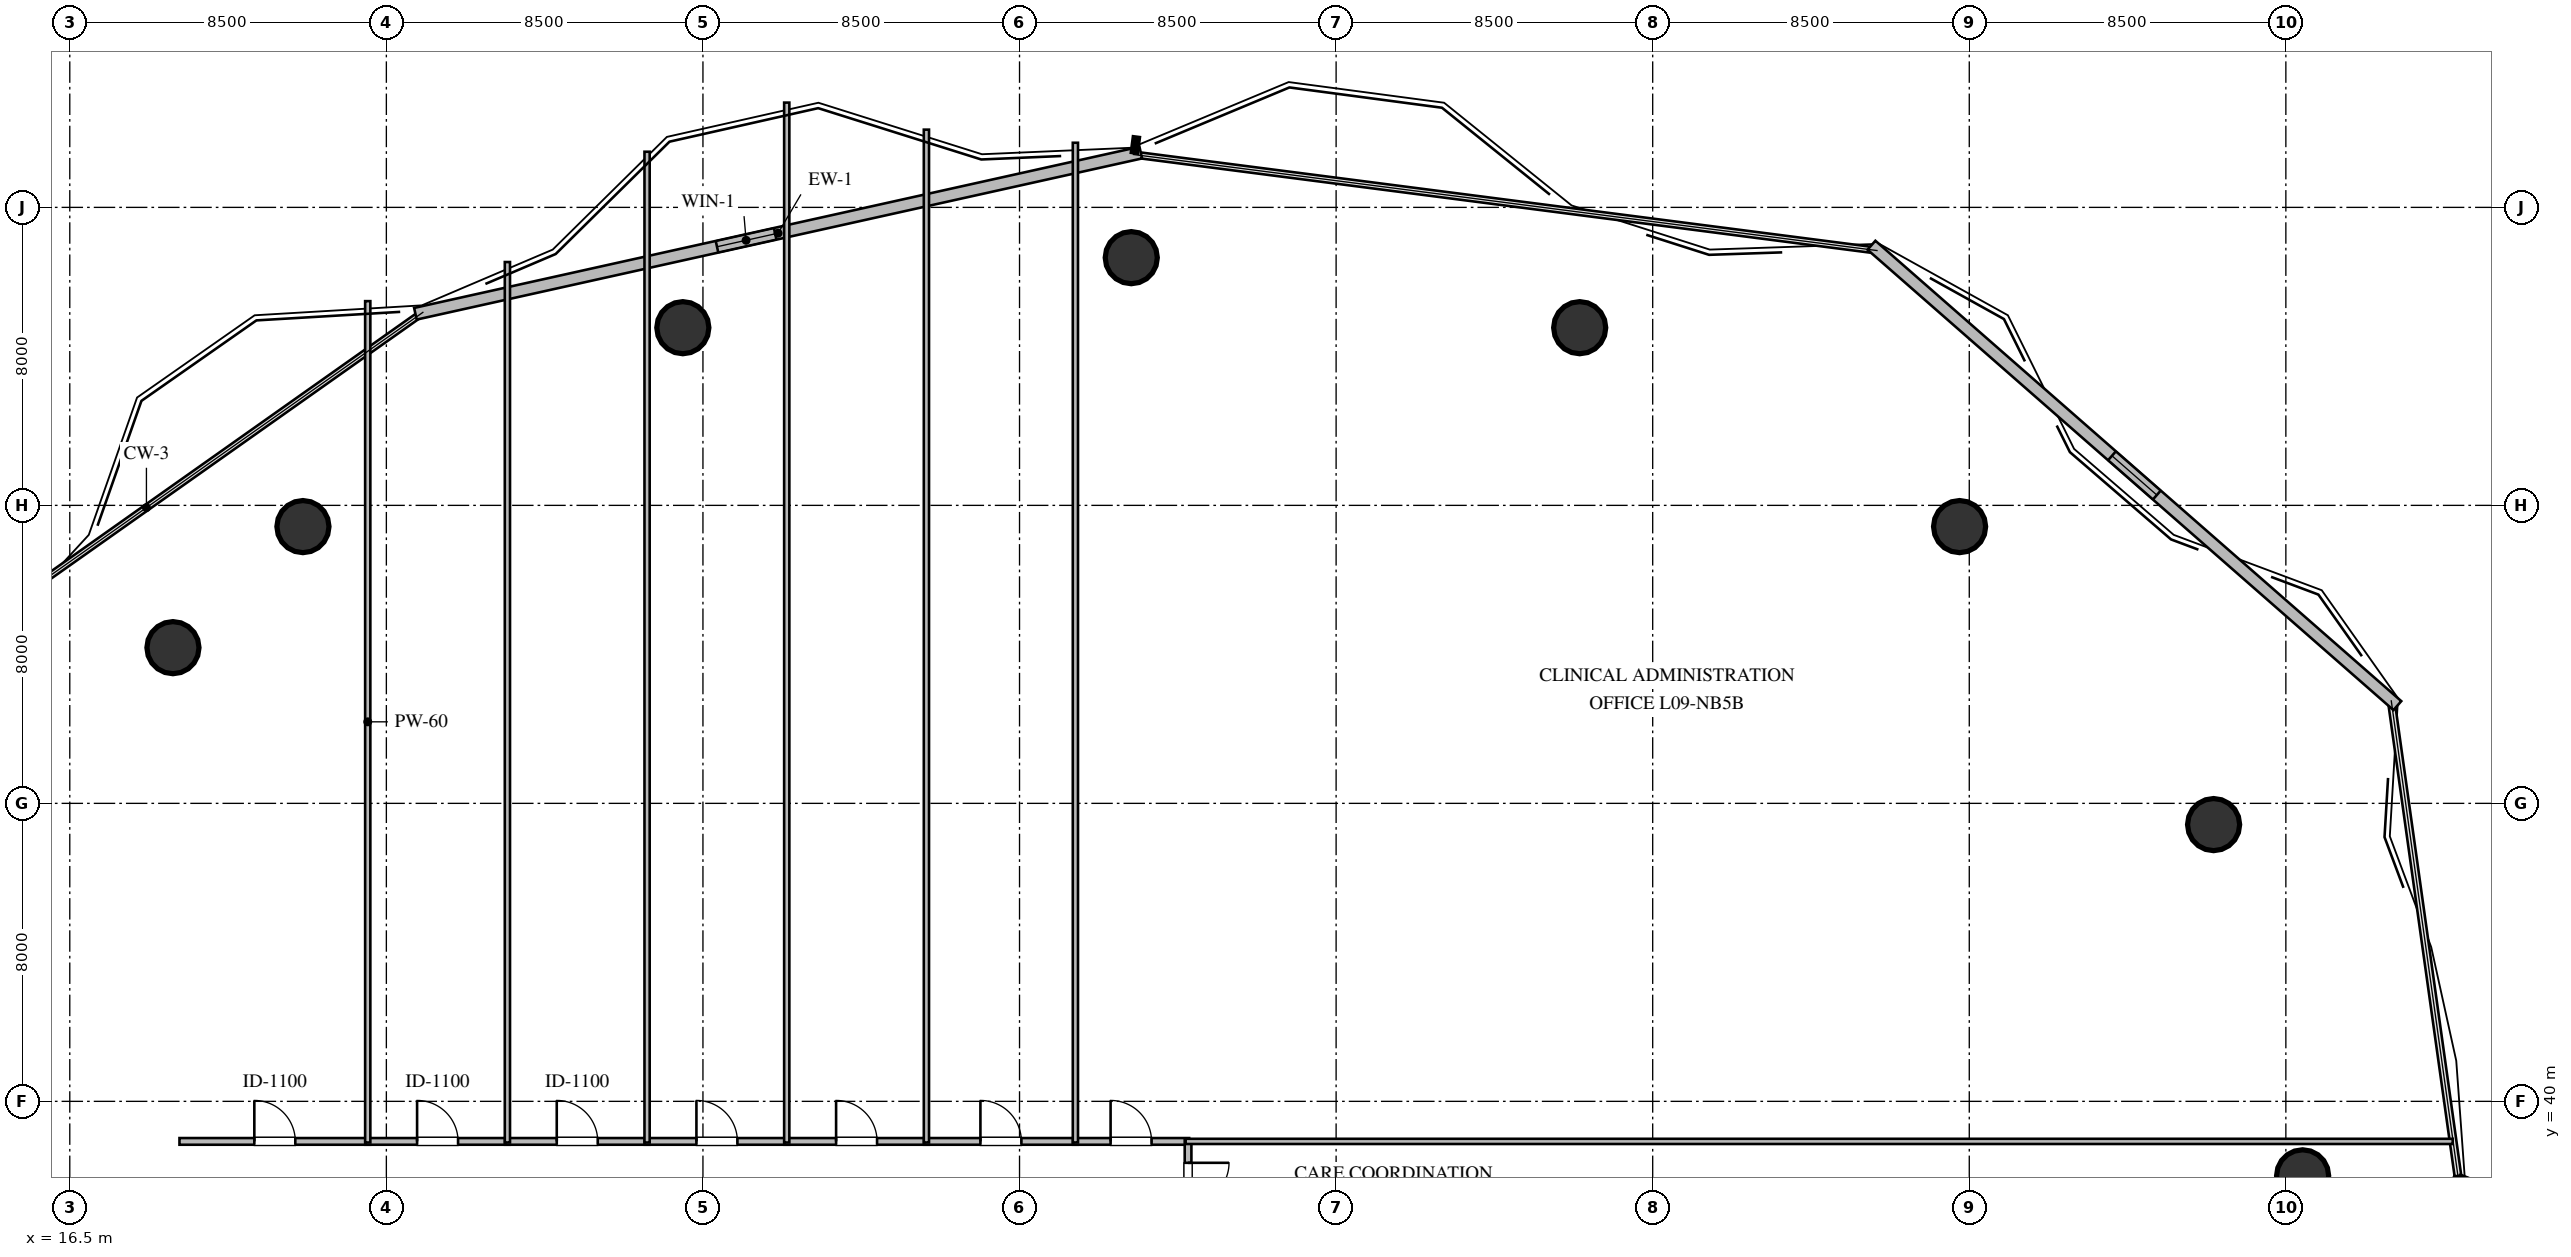
"""IFC4 building model, lengths in metres.
Left out: names, types, materials, properties, quantities, classifications, styles, units other than length and angle.
Written with IfcOpenShell. Run it as: python <this file> out.ifc"""

import sys

from ifc_helpers import new_model, si_unit, direction, frame, frame_2d, origin, origin_2d, place, context, subcontext, project, spatial, rectangle, circle, extrude, element, fill, save


model = new_model("IFC4")
c1 = context("Model", 3, precision=1e-05, world=origin(), true_north=direction((0.0, 1.0)))
c2 = subcontext(c1, "Body", "Model", "MODEL_VIEW")
j1 = project(units=[si_unit("LENGTHUNIT", "METRE"), si_unit("PLANEANGLEUNIT", "RADIAN")], contexts=[c1])
p1 = place(None, origin())
s1 = spatial("IfcSite", under=j1, at=p1, CompositionType="ELEMENT")
p2 = place(p1, origin())
s2 = spatial("IfcBuilding", under=s1, at=p2, CompositionType="ELEMENT")
p3 = place(p2, frame((0.0, 0.0, 38.4)))
s3 = spatial("IfcBuildingStorey", under=s2, at=p3, CompositionType="ELEMENT", Elevation=38.4)
for number, where, z_axis, x_axis in (
    (1, (76.45, 38.0, 0.0), (0.0, 0.0, 1.0), (1.0, 0.0, 0.0)),
    (2, (74.06, 47.43, 0.0), (0.0, 0.0, 1.0), (1.0, 0.0, 0.0)),
    (3, (67.24, 55.43, 0.0), (0.0, 0.0, 1.0), (1.0, 0.0, 0.0)),
    (4, (57.04, 60.77, 0.0), (0.0, 0.0, 1.0), (1.0, 0.0, 0.0)),
    (5, (45.0, 62.65, 0.0), (0.0, 0.0, 1.0), (1.0, 0.0, 0.0)),
    (6, (32.96, 60.77, 0.0), (0.0, 0.0, 1.0), (1.0, 0.0, 0.0)),
    (7, (22.76, 55.43, 0.0), (0.0, 0.0, 1.0), (1.0, 0.0, 0.0)),
    (8, (19.27, 52.18, 0.0), (0.0, 0.0, 1.0), (1.0, 0.0, 0.0)),
):
    element("IfcColumn", number, at=place(p3, frame(where, z_axis=z_axis, x_axis=x_axis)), inside=s3, PredefinedType="COLUMN", context=c2, shape_type="SweptSolid", body=[
        extrude(circle(Radius=0.7, at=origin_2d()), origin(), (0.0, 0.0, 1.0), 3.6),
    ])
p4 = place(p3, frame((25.78, 61.144, 0.0), z_axis=(0.0, 0.0, 1.0), x_axis=(0.976206349039, 0.216843639742, 0.0)))
e9 = element("IfcWall", 9, at=p4, inside=s3, PredefinedType="STANDARD", context=c2, shape_type="SweptSolid", body=[
    extrude(rectangle(XDim=19.949, YDim=0.32, at=frame_2d((9.975, 0.0))), origin(), (0.0, 0.0, 1.0), 3.36),
])
p5 = place(p4, frame((8.295, 0.0, 1.05)))
e10 = element("IfcOpeningElement", 10, at=p5, cuts=e9, PredefinedType="OPENING", context=c2, shape_type="SweptSolid", body=[
    extrude(rectangle(XDim=1.6, YDim=1.5, at=frame_2d((0.8, 0.75))), frame((0.0, 0.17, 0.0), z_axis=(0.0, -1.0, 0.0), x_axis=(1.0, 0.0, 0.0)), (0.0, 0.0, 1.0), 0.34),
])
p6 = place(p3, frame((64.874, 62.984, 0.0), z_axis=(0.0, 0.0, 1.0), x_axis=(0.752445311183, -0.658654730249, 0.0)))
e11 = element("IfcWall", 11, at=p6, inside=s3, PredefinedType="STANDARD", context=c2, shape_type="SweptSolid", body=[
    extrude(rectangle(XDim=18.765, YDim=0.32, at=frame_2d((9.383, 0.0))), origin(), (0.0, 0.0, 1.0), 3.36),
])
p7 = place(p6, frame((8.582, 0.0, 1.05)))
e12 = element("IfcOpeningElement", 12, at=p7, cuts=e11, PredefinedType="OPENING", context=c2, shape_type="SweptSolid", body=[
    extrude(rectangle(XDim=1.6, YDim=1.5, at=frame_2d((0.8, 0.75))), frame((0.0, 0.17, 0.0), z_axis=(0.0, -1.0, 0.0), x_axis=(1.0, 0.0, 0.0)), (0.0, 0.0, 1.0), 0.34),
])
p8 = place(p3, frame((19.445, 38.925, 0.0), z_axis=(0.0, 0.0, 1.0), x_axis=(1.0, 0.0, 0.0)))
e13 = element("IfcWall", 13, at=p8, inside=s3, PredefinedType="PARTITIONING", context=c2, shape_type="SweptSolid", body=[
    extrude(rectangle(XDim=5.12, YDim=0.18, at=frame_2d((2.56, 0.0))), origin(), (0.0, 0.0, 1.0), 3.36),
])
p9 = place(p8, frame((2.01, 0.0, 0.0)))
e14 = element("IfcOpeningElement", 14, at=p9, cuts=e13, PredefinedType="OPENING", context=c2, shape_type="SweptSolid", body=[
    extrude(rectangle(XDim=1.1, YDim=2.1, at=frame_2d((0.55, 1.05))), frame((0.0, 0.1, 0.0), z_axis=(0.0, -1.0, 0.0), x_axis=(1.0, 0.0, 0.0)), (0.0, 0.0, 1.0), 0.2),
])
p10 = place(p3, frame((24.435, 38.925, 0.0), z_axis=(0.0, 0.0, 1.0), x_axis=(1.0, 0.0, 0.0)))
e15 = element("IfcWall", 15, at=p10, inside=s3, PredefinedType="PARTITIONING", context=c2, shape_type="SweptSolid", body=[
    extrude(rectangle(XDim=3.88, YDim=0.18, at=frame_2d((1.94, 0.0))), origin(), (0.0, 0.0, 1.0), 3.36),
])
p11 = place(p10, frame((1.39, 0.0, 0.0)))
e16 = element("IfcOpeningElement", 16, at=p11, cuts=e15, PredefinedType="OPENING", context=c2, shape_type="SweptSolid", body=[
    extrude(rectangle(XDim=1.1, YDim=2.1, at=frame_2d((0.55, 1.05))), frame((0.0, 0.1, 0.0), z_axis=(0.0, -1.0, 0.0), x_axis=(1.0, 0.0, 0.0)), (0.0, 0.0, 1.0), 0.2),
])
p12 = place(p3, frame((28.185, 38.925, 0.0), z_axis=(0.0, 0.0, 1.0), x_axis=(1.0, 0.0, 0.0)))
e17 = element("IfcWall", 17, at=p12, inside=s3, PredefinedType="PARTITIONING", context=c2, shape_type="SweptSolid", body=[
    extrude(rectangle(XDim=3.88, YDim=0.18, at=frame_2d((1.94, 0.0))), origin(), (0.0, 0.0, 1.0), 3.36),
])
p13 = place(p12, frame((1.39, 0.0, 0.0)))
e18 = element("IfcOpeningElement", 18, at=p13, cuts=e17, PredefinedType="OPENING", context=c2, shape_type="SweptSolid", body=[
    extrude(rectangle(XDim=1.1, YDim=2.1, at=frame_2d((0.55, 1.05))), frame((0.0, 0.1, 0.0), z_axis=(0.0, -1.0, 0.0), x_axis=(1.0, 0.0, 0.0)), (0.0, 0.0, 1.0), 0.2),
])
p14 = place(p3, frame((31.935, 38.925, 0.0), z_axis=(0.0, 0.0, 1.0), x_axis=(1.0, 0.0, 0.0)))
e19 = element("IfcWall", 19, at=p14, inside=s3, PredefinedType="PARTITIONING", context=c2, shape_type="SweptSolid", body=[
    extrude(rectangle(XDim=3.88, YDim=0.18, at=frame_2d((1.94, 0.0))), origin(), (0.0, 0.0, 1.0), 3.36),
])
p15 = place(p14, frame((1.39, 0.0, 0.0)))
e20 = element("IfcOpeningElement", 20, at=p15, cuts=e19, PredefinedType="OPENING", context=c2, shape_type="SweptSolid", body=[
    extrude(rectangle(XDim=1.1, YDim=2.1, at=frame_2d((0.55, 1.05))), frame((0.0, 0.1, 0.0), z_axis=(0.0, -1.0, 0.0), x_axis=(1.0, 0.0, 0.0)), (0.0, 0.0, 1.0), 0.2),
])
p16 = place(p3, frame((35.685, 38.925, 0.0), z_axis=(0.0, 0.0, 1.0), x_axis=(1.0, 0.0, 0.0)))
e21 = element("IfcWall", 21, at=p16, inside=s3, PredefinedType="PARTITIONING", context=c2, shape_type="SweptSolid", body=[
    extrude(rectangle(XDim=3.88, YDim=0.18, at=frame_2d((1.94, 0.0))), origin(), (0.0, 0.0, 1.0), 3.36),
])
p17 = place(p16, frame((1.39, 0.0, 0.0)))
e22 = element("IfcOpeningElement", 22, at=p17, cuts=e21, PredefinedType="OPENING", context=c2, shape_type="SweptSolid", body=[
    extrude(rectangle(XDim=1.1, YDim=2.1, at=frame_2d((0.55, 1.05))), frame((0.0, 0.1, 0.0), z_axis=(0.0, -1.0, 0.0), x_axis=(1.0, 0.0, 0.0)), (0.0, 0.0, 1.0), 0.2),
])
p18 = place(p3, frame((39.435, 38.925, 0.0), z_axis=(0.0, 0.0, 1.0), x_axis=(1.0, 0.0, 0.0)))
e23 = element("IfcWall", 23, at=p18, inside=s3, PredefinedType="PARTITIONING", context=c2, shape_type="SweptSolid", body=[
    extrude(rectangle(XDim=4.13, YDim=0.18, at=frame_2d((2.065, 0.0))), origin(), (0.0, 0.0, 1.0), 3.36),
])
p19 = place(p18, frame((1.515, 0.0, 0.0)))
e24 = element("IfcOpeningElement", 24, at=p19, cuts=e23, PredefinedType="OPENING", context=c2, shape_type="SweptSolid", body=[
    extrude(rectangle(XDim=1.1, YDim=2.1, at=frame_2d((0.55, 1.05))), frame((0.0, 0.1, 0.0), z_axis=(0.0, -1.0, 0.0), x_axis=(1.0, 0.0, 0.0)), (0.0, 0.0, 1.0), 0.2),
])
p20 = place(p3, frame((43.435, 38.925, 0.0), z_axis=(0.0, 0.0, 1.0), x_axis=(1.0, 0.0, 0.0)))
e25 = element("IfcWall", 25, at=p20, inside=s3, PredefinedType="PARTITIONING", context=c2, shape_type="SweptSolid", body=[
    extrude(rectangle(XDim=3.12, YDim=0.18, at=frame_2d((1.56, 0.0))), origin(), (0.0, 0.0, 1.0), 3.36),
])
p21 = place(p20, frame((1.01, 0.0, 0.0)))
e26 = element("IfcOpeningElement", 26, at=p21, cuts=e25, PredefinedType="OPENING", context=c2, shape_type="SweptSolid", body=[
    extrude(rectangle(XDim=1.1, YDim=2.1, at=frame_2d((0.55, 1.05))), frame((0.0, 0.1, 0.0), z_axis=(0.0, -1.0, 0.0), x_axis=(1.0, 0.0, 0.0)), (0.0, 0.0, 1.0), 0.2),
])
p22 = place(p3, frame((46.525, 38.955, 0.0), z_axis=(0.0, 0.0, 1.0), x_axis=(0.0, -1.0, 0.0)))
e27 = element("IfcWall", 27, at=p22, inside=s3, PredefinedType="PARTITIONING", context=c2, shape_type="SweptSolid", body=[
    extrude(rectangle(XDim=2.31, YDim=0.18, at=frame_2d((1.155, 0.0))), origin(), (0.0, 0.0, 1.0), 3.36),
])
p23 = place(p22, frame((0.605, 0.0, 0.0)))
e28 = element("IfcOpeningElement", 28, at=p23, cuts=e27, PredefinedType="OPENING", context=c2, shape_type="SweptSolid", body=[
    extrude(rectangle(XDim=1.1, YDim=2.1, at=frame_2d((0.55, 1.05))), frame((0.0, 0.1, 0.0), z_axis=(0.0, -1.0, 0.0), x_axis=(1.0, 0.0, 0.0)), (0.0, 0.0, 1.0), 0.2),
])
p24 = place(p3, frame((24.5, 61.483, 0.0), z_axis=(0.0, 0.0, 1.0), x_axis=(0.0, -1.0, 0.0)))
e29 = element("IfcWall", 29, at=p24, inside=s3, PredefinedType="PARTITIONING", context=c2, shape_type="SweptSolid", body=[
    extrude(rectangle(XDim=22.588, YDim=0.14, at=frame_2d((11.294, 0.0))), origin(), (0.0, 0.0, 1.0), 3.36),
])
p25 = place(p3, frame((28.25, 62.533, 0.0), z_axis=(0.0, 0.0, 1.0), x_axis=(0.0, -1.0, 0.0)))
e30 = element("IfcWall", 30, at=p25, inside=s3, PredefinedType="PARTITIONING", context=c2, shape_type="SweptSolid", body=[
    extrude(rectangle(XDim=23.638, YDim=0.14, at=frame_2d((11.819, 0.0))), origin(), (0.0, 0.0, 1.0), 3.36),
])
p26 = place(p3, frame((32.0, 65.494, 0.0), z_axis=(0.0, 0.0, 1.0), x_axis=(0.0, -1.0, 0.0)))
e31 = element("IfcWall", 31, at=p26, inside=s3, PredefinedType="PARTITIONING", context=c2, shape_type="SweptSolid", body=[
    extrude(rectangle(XDim=26.599, YDim=0.14, at=frame_2d((13.299, 0.0))), origin(), (0.0, 0.0, 1.0), 2.89),
])
p27 = place(p3, frame((35.75, 66.813, 0.0), z_axis=(0.0, 0.0, 1.0), x_axis=(0.0, -1.0, 0.0)))
e32 = element("IfcWall", 32, at=p27, inside=s3, PredefinedType="PARTITIONING", context=c2, shape_type="SweptSolid", body=[
    extrude(rectangle(XDim=27.918, YDim=0.14, at=frame_2d((13.959, 0.0))), origin(), (0.0, 0.0, 1.0), 3.36),
])
p28 = place(p3, frame((39.5, 66.087, 0.0), z_axis=(0.0, 0.0, 1.0), x_axis=(0.0, -1.0, 0.0)))
e33 = element("IfcWall", 33, at=p28, inside=s3, PredefinedType="PARTITIONING", context=c2, shape_type="SweptSolid", body=[
    extrude(rectangle(XDim=27.192, YDim=0.14, at=frame_2d((13.596, 0.0))), origin(), (0.0, 0.0, 1.0), 3.36),
])
p29 = place(p3, frame((43.5, 65.735, 0.0), z_axis=(0.0, 0.0, 1.0), x_axis=(0.0, -1.0, 0.0)))
e34 = element("IfcWall", 34, at=p29, inside=s3, PredefinedType="PARTITIONING", context=c2, shape_type="SweptSolid", body=[
    extrude(rectangle(XDim=26.84, YDim=0.14, at=frame_2d((13.42, 0.0))), origin(), (0.0, 0.0, 1.0), 2.89),
])
p30 = place(p3, frame((80.48, 38.925, 0.0), z_axis=(0.0, 0.0, 1.0), x_axis=(-1.0, 0.0, 0.0)))
e35 = element("IfcWall", 35, at=p30, inside=s3, PredefinedType="PARTITIONING", context=c2, shape_type="SweptSolid", body=[
    extrude(rectangle(XDim=34.02, YDim=0.14, at=frame_2d((17.01, 0.0))), origin(), (0.0, 0.0, 1.0), 3.36),
])
p31 = place(p5, origin())
e36 = element("IfcWindow", 36, at=p31, inside=s3, PartitioningType="SINGLE_PANEL", PredefinedType="WINDOW", context=c2, shape_type="SweptSolid", body=[
    extrude(rectangle(XDim=1.6, YDim=1.5, at=frame_2d((0.8, 0.75))), frame((0.0, 0.03, 0.0), z_axis=(0.0, -1.0, 0.0), x_axis=(1.0, 0.0, 0.0)), (0.0, 0.0, 1.0), 0.06),
])
fill(e10, e36)
p32 = place(p7, origin())
e37 = element("IfcWindow", 37, at=p32, inside=s3, PartitioningType="SINGLE_PANEL", PredefinedType="WINDOW", context=c2, shape_type="SweptSolid", body=[
    extrude(rectangle(XDim=1.6, YDim=1.5, at=frame_2d((0.8, 0.75))), frame((0.0, 0.03, 0.0), z_axis=(0.0, -1.0, 0.0), x_axis=(1.0, 0.0, 0.0)), (0.0, 0.0, 1.0), 0.06),
])
fill(e12, e37)
p33 = place(p9, origin())
e38 = element("IfcDoor", 38, at=p33, inside=s3, OperationType="SINGLE_SWING_LEFT", PredefinedType="DOOR", context=c2, shape_type="SweptSolid", body=[
    extrude(rectangle(XDim=1.1, YDim=2.1, at=frame_2d((0.55, 1.05))), frame((0.0, 0.025, 0.0), z_axis=(0.0, -1.0, 0.0), x_axis=(1.0, 0.0, 0.0)), (0.0, 0.0, 1.0), 0.05),
])
fill(e14, e38)
p34 = place(p11, origin())
e39 = element("IfcDoor", 39, at=p34, inside=s3, OperationType="SINGLE_SWING_LEFT", PredefinedType="DOOR", context=c2, shape_type="SweptSolid", body=[
    extrude(rectangle(XDim=1.1, YDim=2.1, at=frame_2d((0.55, 1.05))), frame((0.0, 0.025, 0.0), z_axis=(0.0, -1.0, 0.0), x_axis=(1.0, 0.0, 0.0)), (0.0, 0.0, 1.0), 0.05),
])
fill(e16, e39)
p35 = place(p13, origin())
e40 = element("IfcDoor", 40, at=p35, inside=s3, OperationType="SINGLE_SWING_LEFT", PredefinedType="DOOR", context=c2, shape_type="SweptSolid", body=[
    extrude(rectangle(XDim=1.1, YDim=2.1, at=frame_2d((0.55, 1.05))), frame((0.0, 0.025, 0.0), z_axis=(0.0, -1.0, 0.0), x_axis=(1.0, 0.0, 0.0)), (0.0, 0.0, 1.0), 0.05),
])
fill(e18, e40)
p36 = place(p15, origin())
e41 = element("IfcDoor", 41, at=p36, inside=s3, OperationType="SINGLE_SWING_LEFT", PredefinedType="DOOR", context=c2, shape_type="SweptSolid", body=[
    extrude(rectangle(XDim=1.1, YDim=2.1, at=frame_2d((0.55, 1.05))), frame((0.0, 0.025, 0.0), z_axis=(0.0, -1.0, 0.0), x_axis=(1.0, 0.0, 0.0)), (0.0, 0.0, 1.0), 0.05),
])
fill(e20, e41)
p37 = place(p17, origin())
e42 = element("IfcDoor", 42, at=p37, inside=s3, OperationType="SINGLE_SWING_LEFT", PredefinedType="DOOR", context=c2, shape_type="SweptSolid", body=[
    extrude(rectangle(XDim=1.1, YDim=2.1, at=frame_2d((0.55, 1.05))), frame((0.0, 0.025, 0.0), z_axis=(0.0, -1.0, 0.0), x_axis=(1.0, 0.0, 0.0)), (0.0, 0.0, 1.0), 0.05),
])
fill(e22, e42)
p38 = place(p19, origin())
e43 = element("IfcDoor", 43, at=p38, inside=s3, OperationType="SINGLE_SWING_LEFT", PredefinedType="DOOR", context=c2, shape_type="SweptSolid", body=[
    extrude(rectangle(XDim=1.1, YDim=2.1, at=frame_2d((0.55, 1.05))), frame((0.0, 0.025, 0.0), z_axis=(0.0, -1.0, 0.0), x_axis=(1.0, 0.0, 0.0)), (0.0, 0.0, 1.0), 0.05),
])
fill(e24, e43)
p39 = place(p21, origin())
e44 = element("IfcDoor", 44, at=p39, inside=s3, OperationType="SINGLE_SWING_LEFT", PredefinedType="DOOR", context=c2, shape_type="SweptSolid", body=[
    extrude(rectangle(XDim=1.1, YDim=2.1, at=frame_2d((0.55, 1.05))), frame((0.0, 0.025, 0.0), z_axis=(0.0, -1.0, 0.0), x_axis=(1.0, 0.0, 0.0)), (0.0, 0.0, 1.0), 0.05),
])
fill(e26, e44)
p40 = place(p23, origin())
e45 = element("IfcDoor", 45, at=p40, inside=s3, OperationType="SINGLE_SWING_LEFT", PredefinedType="DOOR", context=c2, shape_type="SweptSolid", body=[
    extrude(rectangle(XDim=1.1, YDim=2.1, at=frame_2d((0.55, 1.05))), frame((0.0, 0.025, 0.0), z_axis=(0.0, -1.0, 0.0), x_axis=(1.0, 0.0, 0.0)), (0.0, 0.0, 1.0), 0.05),
])
fill(e28, e45)
save(model, sys.argv[1])
